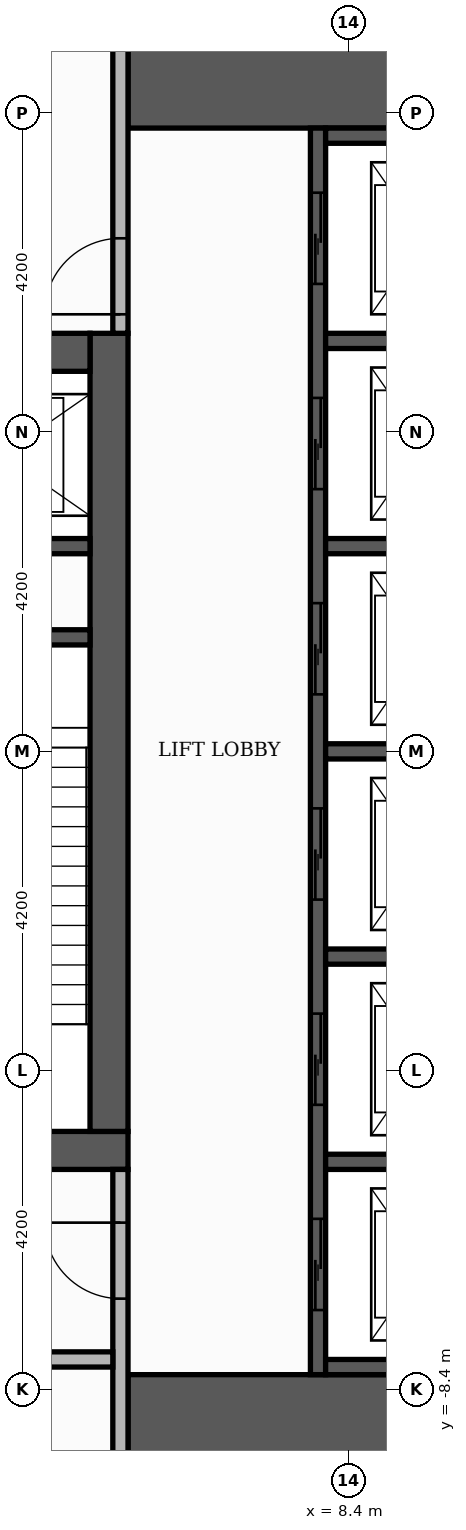
"""IFC4 building model, lengths in metres.
Left out: names, types, materials, properties, quantities, classifications, styles, units other than length and angle.
Written with IfcOpenShell. Run it as: python <this file> out.ifc"""

import sys

from ifc_helpers import new_model, si_unit, direction, frame, frame_2d, origin, place, context, subcontext, project, spatial, rectangle, extrude, element, fill, save


model = new_model("IFC4")
c1 = context("Model", 3, precision=1e-05, world=origin(), true_north=direction((0.0, 1.0)))
c2 = subcontext(c1, "Body", "Model", "MODEL_VIEW")
j1 = project(units=[si_unit("LENGTHUNIT", "METRE"), si_unit("PLANEANGLEUNIT", "RADIAN")], contexts=[c1])
p1 = place(None, origin())
s1 = spatial("IfcSite", under=j1, at=p1, CompositionType="ELEMENT")
p2 = place(p1, origin())
s2 = spatial("IfcBuilding", under=s1, at=p2, CompositionType="ELEMENT")
p3 = place(p2, frame((0.0, 0.0, 235.2)))
s3 = spatial("IfcBuildingStorey", under=s2, at=p3, CompositionType="ELEMENT", Elevation=235.2)
p4 = place(p3, frame((-5.5, -5.25, 0.0), z_axis=(0.0, 0.0, 1.0), x_axis=(1.0, 0.0, 0.0)))
e1 = element("IfcWall", 1, at=p4, inside=s3, PredefinedType="SHEAR", context=c2, shape_type="SweptSolid", body=[
    extrude(rectangle(XDim=11.0, YDim=0.5, at=frame_2d((5.5, 0.0))), origin(), (0.0, 0.0, 1.0), 4.98),
])
p5 = place(p4, frame((4.9, 0.0, 0.0)))
e2 = element("IfcOpeningElement", 2, at=p5, cuts=e1, PredefinedType="OPENING", context=c2, shape_type="SweptSolid", body=[
    extrude(rectangle(XDim=1.2, YDim=2.1, at=frame_2d((0.6, 1.05))), frame((0.0, 0.26, 0.0), z_axis=(0.0, -1.0, 0.0), x_axis=(1.0, 0.0, 0.0)), (0.0, 0.0, 1.0), 0.52),
])
p6 = place(p3, frame((5.25, -5.0, 0.0), z_axis=(0.0, 0.0, 1.0), x_axis=(0.0, 1.0, 0.0)))
e3 = element("IfcWall", 3, at=p6, inside=s3, PredefinedType="SHEAR", context=c2, shape_type="SweptSolid", body=[
    extrude(rectangle(XDim=10.5, YDim=0.5, at=frame_2d((5.25, 0.0))), origin(), (0.0, 0.0, 1.0), 4.98),
])
p7 = place(p3, frame((-5.0, 5.25, 0.0), z_axis=(0.0, 0.0, 1.0), x_axis=(1.0, 0.0, 0.0)))
e4 = element("IfcWall", 4, at=p7, inside=s3, PredefinedType="SHEAR", context=c2, shape_type="SweptSolid", body=[
    extrude(rectangle(XDim=10.0, YDim=0.5, at=frame_2d((5.0, 0.0))), origin(), (0.0, 0.0, 1.0), 4.98),
])
p8 = place(p7, frame((4.4, 0.0, 0.0)))
e5 = element("IfcOpeningElement", 5, at=p8, cuts=e4, PredefinedType="OPENING", context=c2, shape_type="SweptSolid", body=[
    extrude(rectangle(XDim=1.2, YDim=2.1, at=frame_2d((0.6, 1.05))), frame((0.0, 0.26, 0.0), z_axis=(0.0, -1.0, 0.0), x_axis=(1.0, 0.0, 0.0)), (0.0, 0.0, 1.0), 0.52),
])
for number, where, z_axis, x_axis in (
    (6, (5.5, -9.15, 0.0), (0.0, 0.0, 1.0), (1.0, 0.0, 0.0)),
    (7, (5.5, 9.15, 0.0), (0.0, 0.0, 1.0), (1.0, 0.0, 0.0)),
):
    element("IfcWall", number, at=place(p3, frame(where, z_axis=z_axis, x_axis=x_axis)), inside=s3, PredefinedType="SHEAR", context=c2, shape_type="SweptSolid", body=[
        extrude(rectangle(XDim=4.6, YDim=1.9, at=frame_2d((2.3, 0.0))), origin(), (0.0, 0.0, 1.0), 4.98),
    ])
p9 = place(p3, frame((2.15, 1.5, 0.0), z_axis=(0.0, 0.0, 1.0), x_axis=(1.0, 0.0, 0.0)))
e8 = element("IfcWall", 8, at=p9, inside=s3, PredefinedType="SHEAR", context=c2, shape_type="SweptSolid", body=[
    extrude(rectangle(XDim=2.85, YDim=0.2, at=frame_2d((1.425, 0.0))), origin(), (0.0, 0.0, 1.0), 4.98),
])
p10 = place(p3, frame((8.0, -8.2, 0.0), z_axis=(0.0, 0.0, 1.0), x_axis=(0.0, 1.0, 0.0)))
e9 = element("IfcWall", 9, at=p10, inside=s3, PredefinedType="SHEAR", context=c2, shape_type="SweptSolid", body=[
    extrude(rectangle(XDim=16.4, YDim=0.2, at=frame_2d((8.2, 0.0))), origin(), (0.0, 0.0, 1.0), 4.98),
])
p11 = place(p10, frame((0.85, 0.0, 0.0)))
e10 = element("IfcOpeningElement", 10, at=p11, cuts=e9, PredefinedType="OPENING", context=c2, shape_type="SweptSolid", body=[
    extrude(rectangle(XDim=1.2, YDim=2.1, at=frame_2d((0.6, 1.05))), frame((0.0, 0.11, 0.0), z_axis=(0.0, -1.0, 0.0), x_axis=(1.0, 0.0, 0.0)), (0.0, 0.0, 1.0), 0.22),
])
p12 = place(p10, frame((3.55, 0.0, 0.0)))
e11 = element("IfcOpeningElement", 11, at=p12, cuts=e9, PredefinedType="OPENING", context=c2, shape_type="SweptSolid", body=[
    extrude(rectangle(XDim=1.2, YDim=2.1, at=frame_2d((0.6, 1.05))), frame((0.0, 0.11, 0.0), z_axis=(0.0, -1.0, 0.0), x_axis=(1.0, 0.0, 0.0)), (0.0, 0.0, 1.0), 0.22),
])
p13 = place(p10, frame((6.25, 0.0, 0.0)))
e12 = element("IfcOpeningElement", 12, at=p13, cuts=e9, PredefinedType="OPENING", context=c2, shape_type="SweptSolid", body=[
    extrude(rectangle(XDim=1.2, YDim=2.1, at=frame_2d((0.6, 1.05))), frame((0.0, 0.11, 0.0), z_axis=(0.0, -1.0, 0.0), x_axis=(1.0, 0.0, 0.0)), (0.0, 0.0, 1.0), 0.22),
])
p14 = place(p10, frame((8.95, 0.0, 0.0)))
e13 = element("IfcOpeningElement", 13, at=p14, cuts=e9, PredefinedType="OPENING", context=c2, shape_type="SweptSolid", body=[
    extrude(rectangle(XDim=1.2, YDim=2.1, at=frame_2d((0.6, 1.05))), frame((0.0, 0.11, 0.0), z_axis=(0.0, -1.0, 0.0), x_axis=(1.0, 0.0, 0.0)), (0.0, 0.0, 1.0), 0.22),
])
p15 = place(p10, frame((11.65, 0.0, 0.0)))
e14 = element("IfcOpeningElement", 14, at=p15, cuts=e9, PredefinedType="OPENING", context=c2, shape_type="SweptSolid", body=[
    extrude(rectangle(XDim=1.2, YDim=2.1, at=frame_2d((0.6, 1.05))), frame((0.0, 0.11, 0.0), z_axis=(0.0, -1.0, 0.0), x_axis=(1.0, 0.0, 0.0)), (0.0, 0.0, 1.0), 0.22),
])
p16 = place(p10, frame((14.35, 0.0, 0.0)))
e15 = element("IfcOpeningElement", 15, at=p16, cuts=e9, PredefinedType="OPENING", context=c2, shape_type="SweptSolid", body=[
    extrude(rectangle(XDim=1.2, YDim=2.1, at=frame_2d((0.6, 1.05))), frame((0.0, 0.11, 0.0), z_axis=(0.0, -1.0, 0.0), x_axis=(1.0, 0.0, 0.0)), (0.0, 0.0, 1.0), 0.22),
])
for number, where, z_axis, x_axis in (
    (16, (8.1, -8.1, 0.0), (0.0, 0.0, 1.0), (1.0, 0.0, 0.0)),
    (17, (8.1, -5.4, 0.0), (0.0, 0.0, 1.0), (1.0, 0.0, 0.0)),
    (18, (8.1, -2.7, 0.0), (0.0, 0.0, 1.0), (1.0, 0.0, 0.0)),
    (19, (8.1, 0.0, 0.0), (0.0, 0.0, 1.0), (1.0, 0.0, 0.0)),
):
    element("IfcWall", number, at=place(p3, frame(where, z_axis=z_axis, x_axis=x_axis)), inside=s3, PredefinedType="SHEAR", context=c2, shape_type="SweptSolid", body=[
        extrude(rectangle(XDim=2.0, YDim=0.2, at=frame_2d((1.0, 0.0))), origin(), (0.0, 0.0, 1.0), 4.98),
    ])
p17 = place(p3, frame((2.15, 2.7, 0.0), z_axis=(0.0, 0.0, 1.0), x_axis=(1.0, 0.0, 0.0)))
e20 = element("IfcWall", 20, at=p17, inside=s3, PredefinedType="SHEAR", context=c2, shape_type="SweptSolid", body=[
    extrude(rectangle(XDim=2.85, YDim=0.2, at=frame_2d((1.425, 0.0))), origin(), (0.0, 0.0, 1.0), 4.98),
])
for number, where, z_axis, x_axis in (
    (21, (8.1, 2.7, 0.0), (0.0, 0.0, 1.0), (1.0, 0.0, 0.0)),
    (22, (8.1, 5.4, 0.0), (0.0, 0.0, 1.0), (1.0, 0.0, 0.0)),
    (23, (8.1, 8.1, 0.0), (0.0, 0.0, 1.0), (1.0, 0.0, 0.0)),
):
    element("IfcWall", number, at=place(p3, frame(where, z_axis=z_axis, x_axis=x_axis)), inside=s3, PredefinedType="SHEAR", context=c2, shape_type="SweptSolid", body=[
        extrude(rectangle(XDim=2.0, YDim=0.2, at=frame_2d((1.0, 0.0))), origin(), (0.0, 0.0, 1.0), 4.98),
    ])
p18 = place(p3, frame((5.4, -10.1, 0.0), z_axis=(0.0, 0.0, 1.0), x_axis=(0.0, 1.0, 0.0)))
e24 = element("IfcWall", 24, at=p18, inside=s3, PredefinedType="PARTITIONING", context=c2, shape_type="SweptSolid", body=[
    extrude(rectangle(XDim=4.6, YDim=0.2, at=frame_2d((2.3, 0.0))), origin(), (0.0, 0.0, 1.0), 4.98),
])
p19 = place(p18, frame((2.9, 0.0, 0.0)))
e25 = element("IfcOpeningElement", 25, at=p19, cuts=e24, PredefinedType="OPENING", context=c2, shape_type="SweptSolid", body=[
    extrude(rectangle(XDim=1.0, YDim=2.1, at=frame_2d((0.5, 1.05))), frame((0.0, 0.11, 0.0), z_axis=(0.0, -1.0, 0.0), x_axis=(1.0, 0.0, 0.0)), (0.0, 0.0, 1.0), 0.22),
])
p20 = place(p3, frame((0.1, -8.0, 0.0), z_axis=(0.0, 0.0, 1.0), x_axis=(1.0, 0.0, 0.0)))
e26 = element("IfcWall", 26, at=p20, inside=s3, PredefinedType="PARTITIONING", context=c2, shape_type="SweptSolid", body=[
    extrude(rectangle(XDim=5.2, YDim=0.2, at=frame_2d((2.6, 0.0))), origin(), (0.0, 0.0, 1.0), 4.98),
])
p21 = place(p20, frame((2.15, 0.0, 0.0)))
e27 = element("IfcOpeningElement", 27, at=p21, cuts=e26, PredefinedType="OPENING", context=c2, shape_type="SweptSolid", body=[
    extrude(rectangle(XDim=0.9, YDim=2.1, at=frame_2d((0.45, 1.05))), frame((0.0, 0.11, 0.0), z_axis=(0.0, -1.0, 0.0), x_axis=(1.0, 0.0, 0.0)), (0.0, 0.0, 1.0), 0.22),
])
p22 = place(p3, frame((5.4, 5.5, 0.0), z_axis=(0.0, 0.0, 1.0), x_axis=(0.0, 1.0, 0.0)))
e28 = element("IfcWall", 28, at=p22, inside=s3, PredefinedType="PARTITIONING", context=c2, shape_type="SweptSolid", body=[
    extrude(rectangle(XDim=4.6, YDim=0.2, at=frame_2d((2.3, 0.0))), origin(), (0.0, 0.0, 1.0), 4.98),
])
p23 = place(p22, frame((0.25, 0.0, 0.0)))
e29 = element("IfcOpeningElement", 29, at=p23, cuts=e28, PredefinedType="OPENING", context=c2, shape_type="SweptSolid", body=[
    extrude(rectangle(XDim=1.0, YDim=2.1, at=frame_2d((0.5, 1.05))), frame((0.0, 0.11, 0.0), z_axis=(0.0, -1.0, 0.0), x_axis=(1.0, 0.0, 0.0)), (0.0, 0.0, 1.0), 0.22),
])
p24 = place(p11, origin())
e30 = element("IfcDoor", 30, at=p24, inside=s3, OperationType="SLIDING_TO_LEFT", PredefinedType="DOOR", context=c2, shape_type="SweptSolid", body=[
    extrude(rectangle(XDim=1.2, YDim=2.1, at=frame_2d((0.6, 1.05))), frame((0.0, 0.025, 0.0), z_axis=(0.0, -1.0, 0.0), x_axis=(1.0, 0.0, 0.0)), (0.0, 0.0, 1.0), 0.05),
])
fill(e10, e30)
p25 = place(p12, origin())
e31 = element("IfcDoor", 31, at=p25, inside=s3, OperationType="SLIDING_TO_LEFT", PredefinedType="DOOR", context=c2, shape_type="SweptSolid", body=[
    extrude(rectangle(XDim=1.2, YDim=2.1, at=frame_2d((0.6, 1.05))), frame((0.0, 0.025, 0.0), z_axis=(0.0, -1.0, 0.0), x_axis=(1.0, 0.0, 0.0)), (0.0, 0.0, 1.0), 0.05),
])
fill(e11, e31)
p26 = place(p13, origin())
e32 = element("IfcDoor", 32, at=p26, inside=s3, OperationType="SLIDING_TO_LEFT", PredefinedType="DOOR", context=c2, shape_type="SweptSolid", body=[
    extrude(rectangle(XDim=1.2, YDim=2.1, at=frame_2d((0.6, 1.05))), frame((0.0, 0.025, 0.0), z_axis=(0.0, -1.0, 0.0), x_axis=(1.0, 0.0, 0.0)), (0.0, 0.0, 1.0), 0.05),
])
fill(e12, e32)
p27 = place(p14, origin())
e33 = element("IfcDoor", 33, at=p27, inside=s3, OperationType="SLIDING_TO_LEFT", PredefinedType="DOOR", context=c2, shape_type="SweptSolid", body=[
    extrude(rectangle(XDim=1.2, YDim=2.1, at=frame_2d((0.6, 1.05))), frame((0.0, 0.025, 0.0), z_axis=(0.0, -1.0, 0.0), x_axis=(1.0, 0.0, 0.0)), (0.0, 0.0, 1.0), 0.05),
])
fill(e13, e33)
p28 = place(p15, origin())
e34 = element("IfcDoor", 34, at=p28, inside=s3, OperationType="SLIDING_TO_LEFT", PredefinedType="DOOR", context=c2, shape_type="SweptSolid", body=[
    extrude(rectangle(XDim=1.2, YDim=2.1, at=frame_2d((0.6, 1.05))), frame((0.0, 0.025, 0.0), z_axis=(0.0, -1.0, 0.0), x_axis=(1.0, 0.0, 0.0)), (0.0, 0.0, 1.0), 0.05),
])
fill(e14, e34)
p29 = place(p16, origin())
e35 = element("IfcDoor", 35, at=p29, inside=s3, OperationType="SLIDING_TO_LEFT", PredefinedType="DOOR", context=c2, shape_type="SweptSolid", body=[
    extrude(rectangle(XDim=1.2, YDim=2.1, at=frame_2d((0.6, 1.05))), frame((0.0, 0.025, 0.0), z_axis=(0.0, -1.0, 0.0), x_axis=(1.0, 0.0, 0.0)), (0.0, 0.0, 1.0), 0.05),
])
fill(e15, e35)
p30 = place(p23, origin())
e36 = element("IfcDoor", 36, at=p30, inside=s3, OperationType="SINGLE_SWING_LEFT", PredefinedType="DOOR", context=c2, shape_type="SweptSolid", body=[
    extrude(rectangle(XDim=1.0, YDim=2.1, at=frame_2d((0.5, 1.05))), frame((0.0, 0.025, 0.0), z_axis=(0.0, -1.0, 0.0), x_axis=(1.0, 0.0, 0.0)), (0.0, 0.0, 1.0), 0.05),
])
fill(e29, e36)
p31 = place(p19, origin())
e37 = element("IfcDoor", 37, at=p31, inside=s3, OperationType="SINGLE_SWING_RIGHT", PredefinedType="DOOR", context=c2, shape_type="SweptSolid", body=[
    extrude(rectangle(XDim=1.0, YDim=2.1, at=frame_2d((0.5, 1.05))), frame((0.0, 0.025, 0.0), z_axis=(0.0, -1.0, 0.0), x_axis=(1.0, 0.0, 0.0)), (0.0, 0.0, 1.0), 0.05),
])
fill(e25, e37)
save(model, sys.argv[1])
